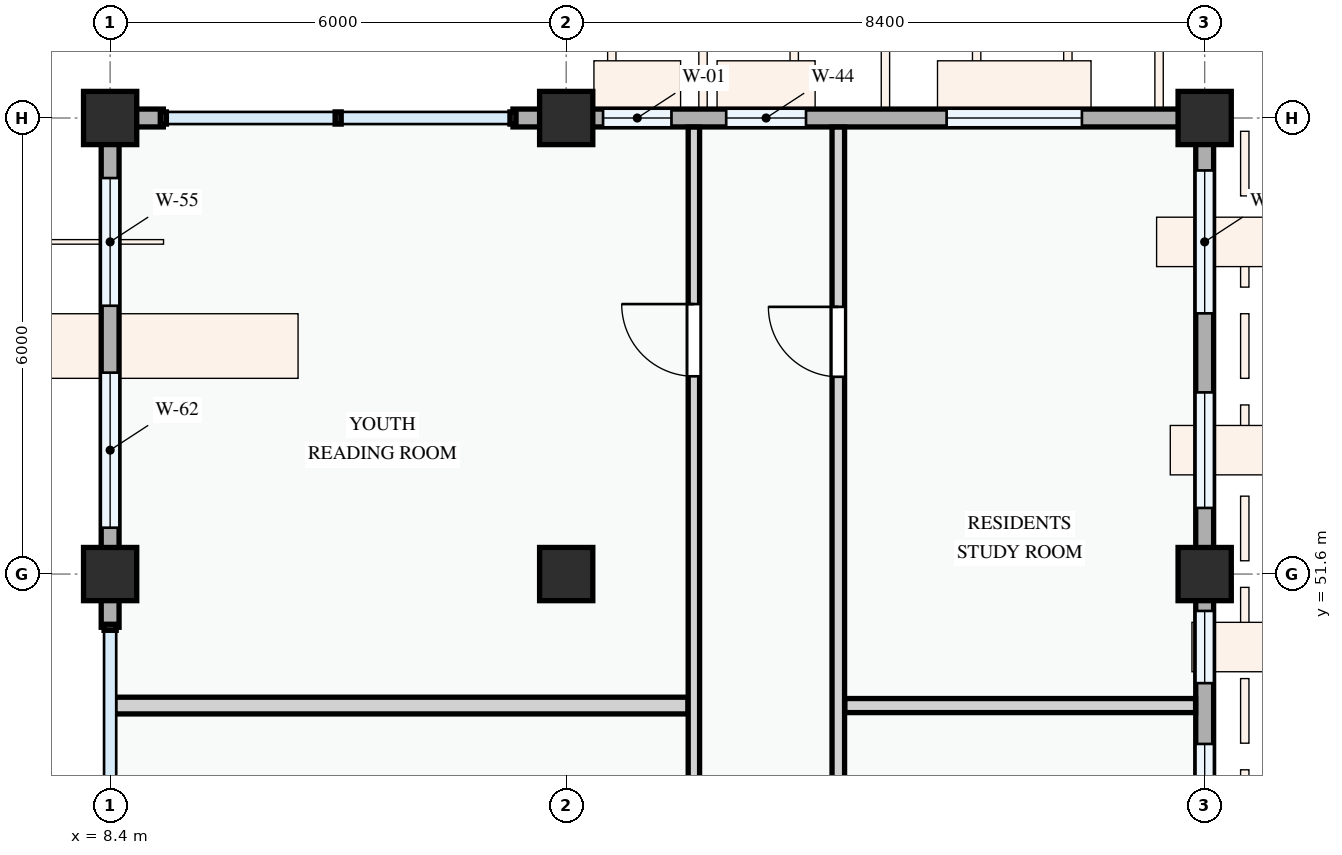
"""IFC4 building model, lengths in metres.
Left out: names, types, materials, properties, quantities, classifications, styles, units other than length and angle.
Written with IfcOpenShell. Run it as: python <this file> out.ifc"""

import sys

from ifc_helpers import new_model, si_unit, direction, frame, frame_2d, origin, origin_2d, place, context, subcontext, project, spatial, rectangle, extrude, element, fill, save


model = new_model("IFC4")
c1 = context("Model", 3, precision=1e-05, world=origin(), true_north=direction((0.0, 1.0)))
c2 = subcontext(c1, "Body", "Model", "MODEL_VIEW")
j1 = project(units=[si_unit("LENGTHUNIT", "METRE"), si_unit("PLANEANGLEUNIT", "RADIAN")], contexts=[c1])
p1 = place(None, origin())
s1 = spatial("IfcSite", under=j1, at=p1, CompositionType="ELEMENT")
p2 = place(p1, origin())
s2 = spatial("IfcBuilding", under=s1, at=p2, CompositionType="ELEMENT")
p3 = place(p2, frame((0.0, 0.0, 4.5)))
s3 = spatial("IfcBuildingStorey", under=s2, at=p3, CompositionType="ELEMENT", Elevation=4.5)
for number, where, z_axis, x_axis in (
    (1, (8.4, 51.6, 0.0), (0.0, 0.0, 1.0), (1.0, 0.0, 0.0)),
    (2, (8.4, 57.6, 0.0), (0.0, 0.0, 1.0), (1.0, 0.0, 0.0)),
    (3, (14.4, 51.6, 0.0), (0.0, 0.0, 1.0), (1.0, 0.0, 0.0)),
    (4, (14.4, 57.6, 0.0), (0.0, 0.0, 1.0), (1.0, 0.0, 0.0)),
    (5, (22.8, 51.6, 0.0), (0.0, 0.0, 1.0), (1.0, 0.0, 0.0)),
    (6, (22.8, 57.6, 0.0), (0.0, 0.0, 1.0), (1.0, 0.0, 0.0)),
):
    element("IfcColumn", number, at=place(p3, frame(where, z_axis=z_axis, x_axis=x_axis)), inside=s3, PredefinedType="COLUMN", context=c2, shape_type="SweptSolid", body=[
        extrude(rectangle(XDim=0.7, YDim=0.7, at=origin_2d()), origin(), (0.0, 0.0, 1.0), 3.6),
    ])
p4 = place(p3, frame((22.8, 43.2, 0.0), z_axis=(0.0, 0.0, 1.0), x_axis=(0.0, 1.0, 0.0)))
e7 = element("IfcWall", 7, at=p4, inside=s3, PredefinedType="STANDARD", context=c2, shape_type="SweptSolid", body=[
    extrude(rectangle(XDim=8.4, YDim=0.235, at=frame_2d((4.2, 0.0))), origin(), (0.0, 0.0, 1.0), 2.725),
])
p5 = place(p4, frame((0.82, 0.0, 0.78)))
e8 = element("IfcOpeningElement", 8, at=p5, cuts=e7, PredefinedType="OPENING", context=c2, shape_type="SweptSolid", body=[
    extrude(rectangle(XDim=2.05, YDim=1.6, at=frame_2d((1.025, 0.8))), frame((0.0, 0.127, 0.0), z_axis=(0.0, -1.0, 0.0), x_axis=(1.0, 0.0, 0.0)), (0.0, 0.0, 1.0), 0.255),
])
p6 = place(p4, frame((3.865, 0.0, 0.78)))
e9 = element("IfcOpeningElement", 9, at=p6, cuts=e7, PredefinedType="OPENING", context=c2, shape_type="SweptSolid", body=[
    extrude(rectangle(XDim=2.3, YDim=1.7, at=frame_2d((1.15, 0.85))), frame((0.0, 0.127, 0.0), z_axis=(0.0, -1.0, 0.0), x_axis=(1.0, 0.0, 0.0)), (0.0, 0.0, 1.0), 0.255),
])
p7 = place(p4, frame((6.965, 0.0, 0.78)))
e10 = element("IfcOpeningElement", 10, at=p7, cuts=e7, PredefinedType="OPENING", context=c2, shape_type="SweptSolid", body=[
    extrude(rectangle(XDim=0.95, YDim=1.15, at=frame_2d((0.475, 0.575))), frame((0.0, 0.127, 0.0), z_axis=(0.0, -1.0, 0.0), x_axis=(1.0, 0.0, 0.0)), (0.0, 0.0, 1.0), 0.255),
])
p8 = place(p3, frame((22.8, 51.6, 0.0), z_axis=(0.0, 0.0, 1.0), x_axis=(0.0, 1.0, 0.0)))
e11 = element("IfcWall", 11, at=p8, inside=s3, PredefinedType="STANDARD", context=c2, shape_type="SweptSolid", body=[
    extrude(rectangle(XDim=6.0, YDim=0.235, at=frame_2d((3.0, 0.0))), origin(), (0.0, 0.0, 1.0), 2.875),
])
p9 = place(p8, frame((0.87, 0.0, 0.78)))
e12 = element("IfcOpeningElement", 12, at=p9, cuts=e11, PredefinedType="OPENING", context=c2, shape_type="SweptSolid", body=[
    extrude(rectangle(XDim=1.52, YDim=1.42, at=frame_2d((0.76, 0.71))), frame((0.0, 0.127, 0.0), z_axis=(0.0, -1.0, 0.0), x_axis=(1.0, 0.0, 0.0)), (0.0, 0.0, 1.0), 0.255),
])
p10 = place(p8, frame((3.43, 0.0, 0.78)))
e13 = element("IfcOpeningElement", 13, at=p10, cuts=e11, PredefinedType="OPENING", context=c2, shape_type="SweptSolid", body=[
    extrude(rectangle(XDim=1.88, YDim=1.52, at=frame_2d((0.94, 0.76))), frame((0.0, 0.127, 0.0), z_axis=(0.0, -1.0, 0.0), x_axis=(1.0, 0.0, 0.0)), (0.0, 0.0, 1.0), 0.255),
])
p11 = place(p3, frame((22.8, 57.6, 0.0), z_axis=(0.0, 0.0, 1.0), x_axis=(-1.0, 0.0, 0.0)))
e14 = element("IfcWall", 14, at=p11, inside=s3, PredefinedType="STANDARD", context=c2, shape_type="SweptSolid", body=[
    extrude(rectangle(XDim=8.4, YDim=0.235, at=frame_2d((4.2, 0.0))), origin(), (0.0, 0.0, 1.0), 2.675),
])
p12 = place(p11, frame((1.615, 0.0, 0.78)))
e15 = element("IfcOpeningElement", 15, at=p12, cuts=e14, PredefinedType="OPENING", context=c2, shape_type="SweptSolid", body=[
    extrude(rectangle(XDim=1.78, YDim=1.42, at=frame_2d((0.89, 0.71))), frame((0.0, 0.127, 0.0), z_axis=(0.0, -1.0, 0.0), x_axis=(1.0, 0.0, 0.0)), (0.0, 0.0, 1.0), 0.255),
])
p13 = place(p11, frame((5.245, 0.0, 0.78)))
e16 = element("IfcOpeningElement", 16, at=p13, cuts=e14, PredefinedType="OPENING", context=c2, shape_type="SweptSolid", body=[
    extrude(rectangle(XDim=1.05, YDim=1.2, at=frame_2d((0.525, 0.6))), frame((0.0, 0.127, 0.0), z_axis=(0.0, -1.0, 0.0), x_axis=(1.0, 0.0, 0.0)), (0.0, 0.0, 1.0), 0.255),
])
p14 = place(p11, frame((7.015, 0.0, 0.78)))
e17 = element("IfcOpeningElement", 17, at=p14, cuts=e14, PredefinedType="OPENING", context=c2, shape_type="SweptSolid", body=[
    extrude(rectangle(XDim=0.9, YDim=1.2, at=frame_2d((0.45, 0.6))), frame((0.0, 0.127, 0.0), z_axis=(0.0, -1.0, 0.0), x_axis=(1.0, 0.0, 0.0)), (0.0, 0.0, 1.0), 0.255),
])
p15 = place(p3, frame((14.4, 57.6, 0.0), z_axis=(0.0, 0.0, 1.0), x_axis=(-1.0, 0.0, 0.0)))
e18 = element("IfcWall", 18, at=p15, inside=s3, PredefinedType="STANDARD", context=c2, shape_type="SweptSolid", body=[
    extrude(rectangle(XDim=0.7, YDim=0.235, at=frame_2d((0.35, 0.0))), origin(), (0.0, 0.0, 1.0), 2.775),
])
p16 = place(p3, frame((9.1, 57.6, 0.0), z_axis=(0.0, 0.0, 1.0), x_axis=(-1.0, 0.0, 0.0)))
e19 = element("IfcWall", 19, at=p16, inside=s3, PredefinedType="STANDARD", context=c2, shape_type="SweptSolid", body=[
    extrude(rectangle(XDim=0.581, YDim=0.235, at=frame_2d((0.29, 0.0))), origin(), (0.0, 0.0, 1.0), 2.775),
])
p17 = place(p3, frame((8.4, 57.6, 0.0), z_axis=(0.0, 0.0, 1.0), x_axis=(0.0, -1.0, 0.0)))
e20 = element("IfcWall", 20, at=p17, inside=s3, PredefinedType="STANDARD", context=c2, shape_type="SweptSolid", body=[
    extrude(rectangle(XDim=6.0, YDim=0.235, at=frame_2d((3.0, 0.0))), origin(), (0.0, 0.0, 1.0), 2.875),
])
p18 = place(p17, frame((0.79, 0.0, 0.78)))
e21 = element("IfcOpeningElement", 21, at=p18, cuts=e20, PredefinedType="OPENING", context=c2, shape_type="SweptSolid", body=[
    extrude(rectangle(XDim=1.68, YDim=1.46, at=frame_2d((0.84, 0.73))), frame((0.0, 0.127, 0.0), z_axis=(0.0, -1.0, 0.0), x_axis=(1.0, 0.0, 0.0)), (0.0, 0.0, 1.0), 0.255),
])
p19 = place(p17, frame((3.35, 0.0, 0.78)))
e22 = element("IfcOpeningElement", 22, at=p19, cuts=e20, PredefinedType="OPENING", context=c2, shape_type="SweptSolid", body=[
    extrude(rectangle(XDim=2.04, YDim=1.46, at=frame_2d((1.02, 0.73))), frame((0.0, 0.127, 0.0), z_axis=(0.0, -1.0, 0.0), x_axis=(1.0, 0.0, 0.0)), (0.0, 0.0, 1.0), 0.255),
])
p20 = place(p3, frame((8.4, 51.6, 0.0), z_axis=(0.0, 0.0, 1.0), x_axis=(0.0, -1.0, 0.0)))
e23 = element("IfcWall", 23, at=p20, inside=s3, PredefinedType="STANDARD", context=c2, shape_type="SweptSolid", body=[
    extrude(rectangle(XDim=0.7, YDim=0.235, at=frame_2d((0.35, 0.0))), origin(), (0.0, 0.0, 1.0), 2.725),
])
p21 = place(p3, frame((8.46, 49.87, 0.0), z_axis=(0.0, 0.0, 1.0), x_axis=(1.0, 0.0, 0.0)))
e24 = element("IfcWall", 24, at=p21, inside=s3, PredefinedType="PARTITIONING", context=c2, shape_type="SweptSolid", body=[
    extrude(rectangle(XDim=7.543, YDim=0.22, at=frame_2d((3.771, 0.0))), origin(), (0.0, 0.0, 1.0), 3.3),
])
p22 = place(p3, frame((18.064, 49.87, 0.0), z_axis=(0.0, 0.0, 1.0), x_axis=(1.0, 0.0, 0.0)))
e25 = element("IfcWall", 25, at=p22, inside=s3, PredefinedType="PARTITIONING", context=c2, shape_type="SweptSolid", body=[
    extrude(rectangle(XDim=4.616, YDim=0.185, at=frame_2d((2.308, 0.0))), origin(), (0.0, 0.0, 1.0), 3.3),
])
p23 = place(p3, frame((16.08, 22.66, 0.0), z_axis=(0.0, 0.0, 1.0), x_axis=(0.0, 1.0, 0.0)))
e26 = element("IfcWall", 26, at=p23, inside=s3, PredefinedType="PARTITIONING", context=c2, shape_type="SweptSolid", body=[
    extrude(rectangle(XDim=34.821, YDim=0.15, at=frame_2d((17.41, 0.0))), origin(), (0.0, 0.0, 1.0), 3.3),
])
p24 = place(p23, frame((2.749, 0.0, 0.0)))
e27 = element("IfcOpeningElement", 27, at=p24, cuts=e26, PredefinedType="OPENING", context=c2, shape_type="SweptSolid", body=[
    extrude(rectangle(XDim=0.95, YDim=2.1, at=frame_2d((0.475, 1.05))), frame((0.0, 0.085, 0.0), z_axis=(0.0, -1.0, 0.0), x_axis=(1.0, 0.0, 0.0)), (0.0, 0.0, 1.0), 0.17),
])
p25 = place(p23, frame((9.966, 0.0, 0.0)))
e28 = element("IfcOpeningElement", 28, at=p25, cuts=e26, PredefinedType="OPENING", context=c2, shape_type="SweptSolid", body=[
    extrude(rectangle(XDim=0.95, YDim=2.1, at=frame_2d((0.475, 1.05))), frame((0.0, 0.085, 0.0), z_axis=(0.0, -1.0, 0.0), x_axis=(1.0, 0.0, 0.0)), (0.0, 0.0, 1.0), 0.17),
])
p26 = place(p23, frame((24.343, 0.0, 0.0)))
e29 = element("IfcOpeningElement", 29, at=p26, cuts=e26, PredefinedType="OPENING", context=c2, shape_type="SweptSolid", body=[
    extrude(rectangle(XDim=0.95, YDim=2.1, at=frame_2d((0.475, 1.05))), frame((0.0, 0.085, 0.0), z_axis=(0.0, -1.0, 0.0), x_axis=(1.0, 0.0, 0.0)), (0.0, 0.0, 1.0), 0.17),
])
p27 = place(p23, frame((31.542, 0.0, 0.0)))
e30 = element("IfcOpeningElement", 30, at=p27, cuts=e26, PredefinedType="OPENING", context=c2, shape_type="SweptSolid", body=[
    extrude(rectangle(XDim=0.95, YDim=2.1, at=frame_2d((0.475, 1.05))), frame((0.0, 0.085, 0.0), z_axis=(0.0, -1.0, 0.0), x_axis=(1.0, 0.0, 0.0)), (0.0, 0.0, 1.0), 0.17),
])
p28 = place(p3, frame((17.98, 22.66, 0.0), z_axis=(0.0, 0.0, 1.0), x_axis=(0.0, 1.0, 0.0)))
e31 = element("IfcWall", 31, at=p28, inside=s3, PredefinedType="PARTITIONING", context=c2, shape_type="SweptSolid", body=[
    extrude(rectangle(XDim=34.821, YDim=0.165, at=frame_2d((17.41, 0.0))), origin(), (0.0, 0.0, 1.0), 3.3),
])
p29 = place(p28, frame((2.746, 0.0, 0.0)))
e32 = element("IfcOpeningElement", 32, at=p29, cuts=e31, PredefinedType="OPENING", context=c2, shape_type="SweptSolid", body=[
    extrude(rectangle(XDim=0.96, YDim=2.12, at=frame_2d((0.48, 1.06))), frame((0.0, 0.093, 0.0), z_axis=(0.0, -1.0, 0.0), x_axis=(1.0, 0.0, 0.0)), (0.0, 0.0, 1.0), 0.185),
])
p30 = place(p28, frame((9.965, 0.0, 0.0)))
e33 = element("IfcOpeningElement", 33, at=p30, cuts=e31, PredefinedType="OPENING", context=c2, shape_type="SweptSolid", body=[
    extrude(rectangle(XDim=0.92, YDim=2.1, at=frame_2d((0.46, 1.05))), frame((0.0, 0.093, 0.0), z_axis=(0.0, -1.0, 0.0), x_axis=(1.0, 0.0, 0.0)), (0.0, 0.0, 1.0), 0.185),
])
p31 = place(p28, frame((24.335, 0.0, 0.0)))
e34 = element("IfcOpeningElement", 34, at=p31, cuts=e31, PredefinedType="OPENING", context=c2, shape_type="SweptSolid", body=[
    extrude(rectangle(XDim=0.92, YDim=2.1, at=frame_2d((0.46, 1.05))), frame((0.0, 0.093, 0.0), z_axis=(0.0, -1.0, 0.0), x_axis=(1.0, 0.0, 0.0)), (0.0, 0.0, 1.0), 0.185),
])
p32 = place(p28, frame((31.535, 0.0, 0.0)))
e35 = element("IfcOpeningElement", 35, at=p32, cuts=e31, PredefinedType="OPENING", context=c2, shape_type="SweptSolid", body=[
    extrude(rectangle(XDim=0.92, YDim=2.1, at=frame_2d((0.46, 1.05))), frame((0.0, 0.093, 0.0), z_axis=(0.0, -1.0, 0.0), x_axis=(1.0, 0.0, 0.0)), (0.0, 0.0, 1.0), 0.185),
])
p33 = place(p6, origin())
e36 = element("IfcWindow", 36, at=p33, inside=s3, PartitioningType="DOUBLE_PANEL_VERTICAL", PredefinedType="WINDOW", context=c2, shape_type="SweptSolid", body=[
    extrude(rectangle(XDim=2.3, YDim=1.7, at=frame_2d((1.15, 0.85))), frame((0.0, 0.03, 0.0), z_axis=(0.0, -1.0, 0.0), x_axis=(1.0, 0.0, 0.0)), (0.0, 0.0, 1.0), 0.06),
])
fill(e9, e36)
p34 = place(p7, origin())
e37 = element("IfcWindow", 37, at=p34, inside=s3, PartitioningType="SINGLE_PANEL", PredefinedType="WINDOW", context=c2, shape_type="SweptSolid", body=[
    extrude(rectangle(XDim=0.95, YDim=1.15, at=frame_2d((0.475, 0.575))), frame((0.0, 0.03, 0.0), z_axis=(0.0, -1.0, 0.0), x_axis=(1.0, 0.0, 0.0)), (0.0, 0.0, 1.0), 0.06),
])
fill(e10, e37)
p35 = place(p9, origin())
e38 = element("IfcWindow", 38, at=p35, inside=s3, PartitioningType="SINGLE_PANEL", PredefinedType="WINDOW", context=c2, shape_type="SweptSolid", body=[
    extrude(rectangle(XDim=1.52, YDim=1.42, at=frame_2d((0.76, 0.71))), frame((0.0, 0.03, 0.0), z_axis=(0.0, -1.0, 0.0), x_axis=(1.0, 0.0, 0.0)), (0.0, 0.0, 1.0), 0.06),
])
fill(e12, e38)
p36 = place(p10, origin())
e39 = element("IfcWindow", 39, at=p36, inside=s3, PartitioningType="DOUBLE_PANEL_VERTICAL", PredefinedType="WINDOW", context=c2, shape_type="SweptSolid", body=[
    extrude(rectangle(XDim=1.88, YDim=1.52, at=frame_2d((0.94, 0.76))), frame((0.0, 0.03, 0.0), z_axis=(0.0, -1.0, 0.0), x_axis=(1.0, 0.0, 0.0)), (0.0, 0.0, 1.0), 0.06),
])
fill(e13, e39)
p37 = place(p12, origin())
e40 = element("IfcWindow", 40, at=p37, inside=s3, PartitioningType="DOUBLE_PANEL_VERTICAL", PredefinedType="WINDOW", context=c2, shape_type="SweptSolid", body=[
    extrude(rectangle(XDim=1.78, YDim=1.42, at=frame_2d((0.89, 0.71))), frame((0.0, 0.03, 0.0), z_axis=(0.0, -1.0, 0.0), x_axis=(1.0, 0.0, 0.0)), (0.0, 0.0, 1.0), 0.06),
])
fill(e15, e40)
p38 = place(p13, origin())
e41 = element("IfcWindow", 41, at=p38, inside=s3, PartitioningType="SINGLE_PANEL", PredefinedType="WINDOW", context=c2, shape_type="SweptSolid", body=[
    extrude(rectangle(XDim=1.05, YDim=1.2, at=frame_2d((0.525, 0.6))), frame((0.0, 0.03, 0.0), z_axis=(0.0, -1.0, 0.0), x_axis=(1.0, 0.0, 0.0)), (0.0, 0.0, 1.0), 0.06),
])
fill(e16, e41)
p39 = place(p14, origin())
e42 = element("IfcWindow", 42, at=p39, inside=s3, PartitioningType="SINGLE_PANEL", PredefinedType="WINDOW", context=c2, shape_type="SweptSolid", body=[
    extrude(rectangle(XDim=0.9, YDim=1.2, at=frame_2d((0.45, 0.6))), frame((0.0, 0.03, 0.0), z_axis=(0.0, -1.0, 0.0), x_axis=(1.0, 0.0, 0.0)), (0.0, 0.0, 1.0), 0.06),
])
fill(e17, e42)
p40 = place(p18, origin())
e43 = element("IfcWindow", 43, at=p40, inside=s3, PartitioningType="DOUBLE_PANEL_VERTICAL", PredefinedType="WINDOW", context=c2, shape_type="SweptSolid", body=[
    extrude(rectangle(XDim=1.68, YDim=1.46, at=frame_2d((0.84, 0.73))), frame((0.0, 0.03, 0.0), z_axis=(0.0, -1.0, 0.0), x_axis=(1.0, 0.0, 0.0)), (0.0, 0.0, 1.0), 0.06),
])
fill(e21, e43)
p41 = place(p19, origin())
e44 = element("IfcWindow", 44, at=p41, inside=s3, PartitioningType="DOUBLE_PANEL_VERTICAL", PredefinedType="WINDOW", context=c2, shape_type="SweptSolid", body=[
    extrude(rectangle(XDim=2.04, YDim=1.46, at=frame_2d((1.02, 0.73))), frame((0.0, 0.03, 0.0), z_axis=(0.0, -1.0, 0.0), x_axis=(1.0, 0.0, 0.0)), (0.0, 0.0, 1.0), 0.06),
])
fill(e22, e44)
p42 = place(p27, origin())
e45 = element("IfcDoor", 45, at=p42, inside=s3, OperationType="SINGLE_SWING_RIGHT", PredefinedType="DOOR", context=c2, shape_type="SweptSolid", body=[
    extrude(rectangle(XDim=0.95, YDim=2.1, at=frame_2d((0.475, 1.05))), frame((0.0, 0.025, 0.0), z_axis=(0.0, -1.0, 0.0), x_axis=(1.0, 0.0, 0.0)), (0.0, 0.0, 1.0), 0.05),
])
fill(e30, e45)
p43 = place(p32, origin())
e46 = element("IfcDoor", 46, at=p43, inside=s3, OperationType="SINGLE_SWING_RIGHT", PredefinedType="DOOR", context=c2, shape_type="SweptSolid", body=[
    extrude(rectangle(XDim=0.92, YDim=2.1, at=frame_2d((0.46, 1.05))), frame((0.0, 0.025, 0.0), z_axis=(0.0, -1.0, 0.0), x_axis=(1.0, 0.0, 0.0)), (0.0, 0.0, 1.0), 0.05),
])
fill(e35, e46)
save(model, sys.argv[1])
